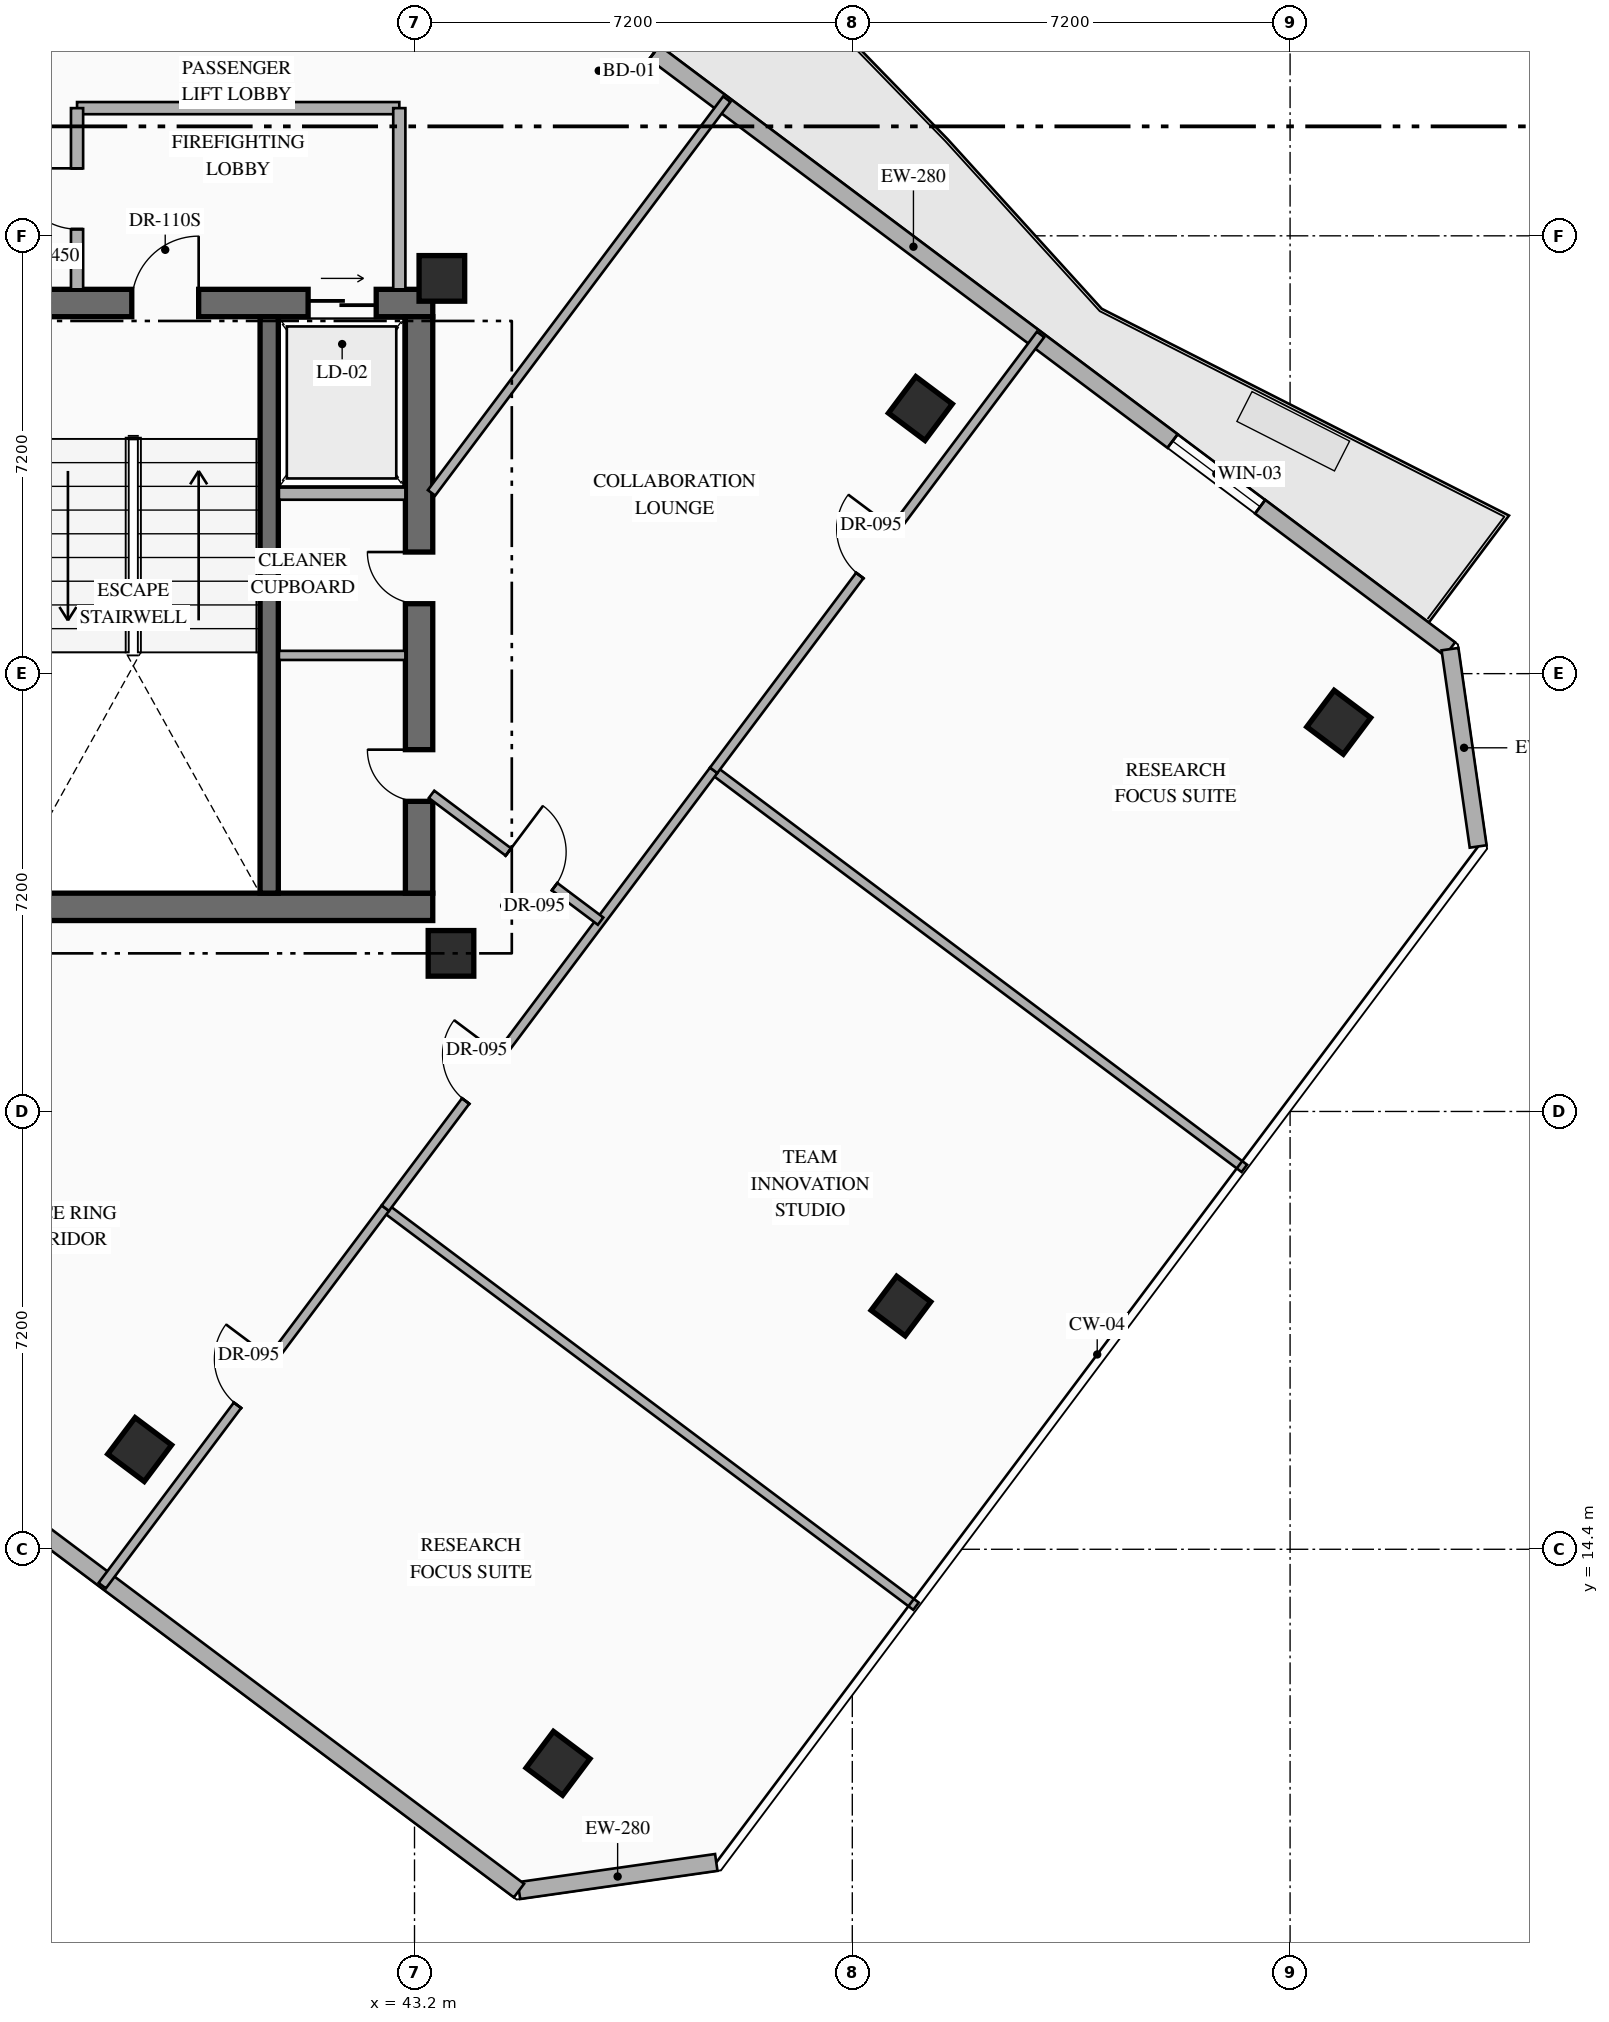
"""IFC4 building model, lengths in metres.
Left out: names, types, materials, properties, quantities, classifications, styles, units other than length and angle.
Written with IfcOpenShell. Run it as: python <this file> out.ifc"""

import sys

from ifc_helpers import new_model, si_unit, direction, frame, frame_2d, origin, origin_2d, place, context, subcontext, project, spatial, rectangle, hollow_rectangle, extrude, element, fill, save


model = new_model("IFC4")
c1 = context("Model", 3, precision=1e-05, world=origin(), true_north=direction((0.0, 1.0)))
c2 = subcontext(c1, "Body", "Model", "MODEL_VIEW")
j1 = project(units=[si_unit("LENGTHUNIT", "METRE"), si_unit("PLANEANGLEUNIT", "RADIAN")], contexts=[c1])
p1 = place(None, origin())
s1 = spatial("IfcSite", under=j1, at=p1, CompositionType="ELEMENT")
p2 = place(p1, origin())
s2 = spatial("IfcBuilding", under=s1, at=p2, CompositionType="ELEMENT")
p3 = place(p2, frame((0.0, 0.0, 198.75)))
s3 = spatial("IfcBuildingStorey", under=s2, at=p3, CompositionType="ELEMENT", Elevation=198.75)
p4 = place(p3, frame((36.04, 24.965, 0.0), z_axis=(0.0, 0.0, 1.0), x_axis=(1.0, 0.0, 0.0)))
e1 = element("IfcWall", 1, at=p4, inside=s3, PredefinedType="SHEAR", context=c2, shape_type="SweptSolid", body=[
    extrude(rectangle(XDim=7.46, YDim=0.45, at=frame_2d((3.73, 0.0))), origin(), (0.0, 0.0, 1.0), 3.6),
])
p5 = place(p3, frame((36.04, 34.895, 0.0), z_axis=(0.0, 0.0, 1.0), x_axis=(1.0, 0.0, 0.0)))
e2 = element("IfcWall", 2, at=p5, inside=s3, PredefinedType="SHEAR", context=c2, shape_type="SweptSolid", body=[
    extrude(rectangle(XDim=7.46, YDim=0.45, at=frame_2d((3.73, 0.0))), origin(), (0.0, 0.0, 1.0), 3.6),
])
p6 = place(p5, frame((2.51, 0.0, 0.0)))
e3 = element("IfcOpeningElement", 3, at=p6, cuts=e2, PredefinedType="OPENING", context=c2, shape_type="SweptSolid", body=[
    extrude(rectangle(XDim=1.1, YDim=2.2, at=frame_2d((0.55, 1.1))), frame((0.0, 0.235, 0.0), z_axis=(0.0, -1.0, 0.0), x_axis=(1.0, 0.0, 0.0)), (0.0, 0.0, 1.0), 0.47),
])
p7 = place(p5, frame((5.41, 0.0, 0.0)))
e4 = element("IfcOpeningElement", 4, at=p7, cuts=e2, PredefinedType="OPENING", context=c2, shape_type="SweptSolid", body=[
    extrude(rectangle(XDim=1.12, YDim=2.15, at=frame_2d((0.56, 1.075))), frame((0.0, 0.235, 0.0), z_axis=(0.0, -1.0, 0.0), x_axis=(1.0, 0.0, 0.0)), (0.0, 0.0, 1.0), 0.47),
])
p8 = place(p3, frame((43.275, 25.19, 0.0), z_axis=(0.0, 0.0, 1.0), x_axis=(0.0, 1.0, 0.0)))
e5 = element("IfcWall", 5, at=p8, inside=s3, PredefinedType="SHEAR", context=c2, shape_type="SweptSolid", body=[
    extrude(rectangle(XDim=9.48, YDim=0.45, at=frame_2d((4.74, 0.0))), origin(), (0.0, 0.0, 1.0), 3.6),
])
p9 = place(p8, frame((1.51, 0.0, 0.0)))
e6 = element("IfcOpeningElement", 6, at=p9, cuts=e5, PredefinedType="OPENING", context=c2, shape_type="SweptSolid", body=[
    extrude(rectangle(XDim=0.85, YDim=2.08, at=frame_2d((0.425, 1.04))), frame((0.0, 0.235, 0.0), z_axis=(0.0, -1.0, 0.0), x_axis=(1.0, 0.0, 0.0)), (0.0, 0.0, 1.0), 0.47),
])
p10 = place(p8, frame((4.76, 0.0, 0.0)))
e7 = element("IfcOpeningElement", 7, at=p10, cuts=e5, PredefinedType="OPENING", context=c2, shape_type="SweptSolid", body=[
    extrude(rectangle(XDim=0.85, YDim=2.08, at=frame_2d((0.425, 1.04))), frame((0.0, 0.235, 0.0), z_axis=(0.0, -1.0, 0.0), x_axis=(1.0, 0.0, 0.0)), (0.0, 0.0, 1.0), 0.47),
])
p11 = place(p3, frame((40.81, 25.19, 0.0), z_axis=(0.0, 0.0, 1.0), x_axis=(0.0, 1.0, 0.0)))
e8 = element("IfcWall", 8, at=p11, inside=s3, PredefinedType="SHEAR", context=c2, shape_type="SweptSolid", body=[
    extrude(rectangle(XDim=9.48, YDim=0.3, at=frame_2d((4.74, 0.0))), origin(), (0.0, 0.0, 1.0), 3.6),
])
for number, where, z_axis, x_axis in (
    (9, (43.8, 24.2, 0.0), (0.0, 0.0, 1.0), (1.0, 0.0, 0.0)),
    (10, (43.65, 35.3, 0.0), (0.0, 0.0, 1.0), (1.0, 0.0, 0.0)),
    (11, (38.68, 16.04, 0.0), (0.0, 0.0, 1.0), (0.8, -0.6, 0.0)),
    (12, (51.52, 33.16, 0.0), (0.0, 0.0, 1.0), (0.8, -0.6, 0.0)),
    (13, (45.56, 10.88, 0.0), (0.0, 0.0, 1.0), (0.8, -0.6, 0.0)),
    (14, (58.4, 28.0, 0.0), (0.0, 0.0, 1.0), (0.8, -0.6, 0.0)),
):
    element("IfcColumn", number, at=place(p3, frame(where, z_axis=z_axis, x_axis=x_axis)), inside=s3, PredefinedType="COLUMN", context=c2, shape_type="SweptSolid", body=[
        extrude(hollow_rectangle(XDim=0.75, YDim=0.75, WallThickness=0.028, at=origin_2d()), origin(), (0.0, 0.0, 1.0), 3.6),
    ])
p12 = place(p3, frame((51.2, 18.4, 0.0), z_axis=(0.0, 0.0, 1.0), x_axis=(0.799999996291, -0.600000004945, 0.0)))
e15 = element("IfcColumn", 15, at=p12, inside=s3, PredefinedType="COLUMN", context=c2, shape_type="SweptSolid", body=[
    extrude(hollow_rectangle(XDim=0.7, YDim=0.7, WallThickness=0.028, at=origin_2d()), origin(), (0.0, 0.0, 1.0), 3.6),
])
p13 = place(p3, frame((44.86, 40.73, 0.0), z_axis=(0.0, 0.0, 1.0), x_axis=(0.800007624502, -0.599989833863, 0.0)))
e16 = element("IfcWall", 16, at=p13, inside=s3, PredefinedType="STANDARD", context=c2, shape_type="SweptSolid", body=[
    extrude(rectangle(XDim=19.212, YDim=0.28, at=frame_2d((9.606, 0.0))), origin(), (0.0, 0.0, 1.0), 3.35),
])
p14 = place(p13, frame((1.755, 0.0, 0.0)))
e17 = element("IfcOpeningElement", 17, at=p14, cuts=e16, PredefinedType="OPENING", context=c2, shape_type="SweptSolid", body=[
    extrude(rectangle(XDim=1.1, YDim=2.2, at=frame_2d((0.55, 1.1))), frame((0.0, 0.15, 0.0), z_axis=(0.0, -1.0, 0.0), x_axis=(1.0, 0.0, 0.0)), (0.0, 0.0, 1.0), 0.3),
])
p15 = place(p13, frame((13.509, 0.0, 0.85)))
e18 = element("IfcOpeningElement", 18, at=p15, cuts=e16, PredefinedType="OPENING", context=c2, shape_type="SweptSolid", body=[
    extrude(rectangle(XDim=1.8, YDim=2.1, at=frame_2d((0.9, 1.05))), frame((0.0, 0.15, 0.0), z_axis=(0.0, -1.0, 0.0), x_axis=(1.0, 0.0, 0.0)), (0.0, 0.0, 1.0), 0.3),
])
p16 = place(p3, frame((60.23, 29.203, 0.0), z_axis=(0.0, 0.0, 1.0), x_axis=(0.141296221922, -0.989967361922, 0.0)))
e19 = element("IfcWall", 19, at=p16, inside=s3, PredefinedType="STANDARD", context=c2, shape_type="SweptSolid", body=[
    extrude(rectangle(XDim=3.278, YDim=0.28, at=frame_2d((1.639, 0.0))), origin(), (0.0, 0.0, 1.0), 3.35),
])
p17 = place(p3, frame((48.163, 9.25, 0.0), z_axis=(0.0, 0.0, 1.0), x_axis=(-0.989979263428, -0.141212810973, 0.0)))
e20 = element("IfcWall", 20, at=p17, inside=s3, PredefinedType="STANDARD", context=c2, shape_type="SweptSolid", body=[
    extrude(rectangle(XDim=3.278, YDim=0.28, at=frame_2d((1.639, 0.0))), origin(), (0.0, 0.0, 1.0), 3.35),
])
p18 = place(p3, frame((44.918, 8.787, 0.0), z_axis=(0.0, 0.0, 1.0), x_axis=(-0.800004765927, 0.599993645378, 0.0)))
e21 = element("IfcWall", 21, at=p18, inside=s3, PredefinedType="STANDARD", context=c2, shape_type="SweptSolid", body=[
    extrude(rectangle(XDim=24.588, YDim=0.28, at=frame_2d((12.294, 0.0))), origin(), (0.0, 0.0, 1.0), 3.35),
])
p19 = place(p3, frame((40.97, 31.76, 0.0), z_axis=(0.0, 0.0, 1.0), x_axis=(1.0, 0.0, 0.0)))
e22 = element("IfcWall", 22, at=p19, inside=s3, PredefinedType="STANDARD", context=c2, shape_type="SweptSolid", body=[
    extrude(rectangle(XDim=2.08, YDim=0.2, at=frame_2d((1.04, 0.0))), origin(), (0.0, 0.0, 1.0), 3.35),
])
p20 = place(p3, frame((40.97, 29.1, 0.0), z_axis=(0.0, 0.0, 1.0), x_axis=(1.0, 0.0, 0.0)))
e23 = element("IfcWall", 23, at=p20, inside=s3, PredefinedType="PARTITIONING", context=c2, shape_type="SweptSolid", body=[
    extrude(rectangle(XDim=2.08, YDim=0.15, at=frame_2d((1.04, 0.0))), origin(), (0.0, 0.0, 1.0), 3.35),
])
p21 = place(p3, frame((37.65, 38.1, 0.0), z_axis=(0.0, 0.0, 1.0), x_axis=(1.0, 0.0, 0.0)))
e24 = element("IfcWall", 24, at=p21, inside=s3, PredefinedType="STANDARD", context=c2, shape_type="SweptSolid", body=[
    extrude(rectangle(XDim=5.3, YDim=0.2, at=frame_2d((2.65, 0.0))), origin(), (0.0, 0.0, 1.0), 3.35),
])
p22 = place(p3, frame((42.95, 35.12, 0.0), z_axis=(0.0, 0.0, 1.0), x_axis=(0.0, 1.0, 0.0)))
e25 = element("IfcWall", 25, at=p22, inside=s3, PredefinedType="STANDARD", context=c2, shape_type="SweptSolid", body=[
    extrude(rectangle(XDim=2.98, YDim=0.2, at=frame_2d((1.49, 0.0))), origin(), (0.0, 0.0, 1.0), 3.35),
])
p23 = place(p3, frame((37.65, 35.12, 0.0), z_axis=(0.0, 0.0, 1.0), x_axis=(0.0, 1.0, 0.0)))
e26 = element("IfcWall", 26, at=p23, inside=s3, PredefinedType="STANDARD", context=c2, shape_type="SweptSolid", body=[
    extrude(rectangle(XDim=2.98, YDim=0.2, at=frame_2d((1.49, 0.0))), origin(), (0.0, 0.0, 1.0), 3.35),
])
p24 = place(p23, frame((0.99, 0.0, 0.0)))
e27 = element("IfcOpeningElement", 27, at=p24, cuts=e26, PredefinedType="OPENING", context=c2, shape_type="SweptSolid", body=[
    extrude(rectangle(XDim=1.0, YDim=2.2, at=frame_2d((0.5, 1.1))), frame((0.0, 0.11, 0.0), z_axis=(0.0, -1.0, 0.0), x_axis=(1.0, 0.0, 0.0)), (0.0, 0.0, 1.0), 0.22),
])
p25 = place(p3, frame((42.72, 20.01, 0.0), z_axis=(0.0, 0.0, 1.0), x_axis=(0.800005370633, -0.599992839089, 0.0)))
e28 = element("IfcWall", 28, at=p25, inside=s3, PredefinedType="PARTITIONING", context=c2, shape_type="SweptSolid", body=[
    extrude(rectangle(XDim=10.91, YDim=0.15, at=frame_2d((5.455, 0.0))), origin(), (0.0, 0.0, 1.0), 3.35),
])
p26 = place(p3, frame((38.064, 13.802, 0.0), z_axis=(0.0, 0.0, 1.0), x_axis=(0.6, 0.8, 0.0)))
e29 = element("IfcWall", 29, at=p26, inside=s3, PredefinedType="PARTITIONING", context=c2, shape_type="SweptSolid", body=[
    extrude(rectangle(XDim=7.76, YDim=0.15, at=frame_2d((3.88, 0.0))), origin(), (0.0, 0.0, 1.0), 3.35),
])
p27 = place(p26, frame((3.708, 0.0, 0.0)))
e30 = element("IfcOpeningElement", 30, at=p27, cuts=e29, PredefinedType="OPENING", context=c2, shape_type="SweptSolid", body=[
    extrude(rectangle(XDim=0.95, YDim=2.15, at=frame_2d((0.475, 1.075))), frame((0.0, 0.085, 0.0), z_axis=(0.0, -1.0, 0.0), x_axis=(1.0, 0.0, 0.0)), (0.0, 0.0, 1.0), 0.17),
])
p28 = place(p3, frame((48.12, 27.21, 0.0), z_axis=(0.0, 0.0, 1.0), x_axis=(0.799997314611, -0.600003580502, 0.0)))
e31 = element("IfcWall", 31, at=p28, inside=s3, PredefinedType="PARTITIONING", context=c2, shape_type="SweptSolid", body=[
    extrude(rectangle(XDim=10.91, YDim=0.15, at=frame_2d((5.455, 0.0))), origin(), (0.0, 0.0, 1.0), 3.045),
])
p29 = place(p3, frame((42.72, 20.01, 0.0), z_axis=(0.0, 0.0, 1.0), x_axis=(0.600013020683, 0.799990234322, 0.0)))
e32 = element("IfcWall", 32, at=p29, inside=s3, PredefinedType="PARTITIONING", context=c2, shape_type="SweptSolid", body=[
    extrude(rectangle(XDim=9.0, YDim=0.15, at=frame_2d((4.5, 0.0))), origin(), (0.0, 0.0, 1.0), 3.35),
])
p30 = place(p29, frame((2.202, 0.0, 0.0)))
e33 = element("IfcOpeningElement", 33, at=p30, cuts=e32, PredefinedType="OPENING", context=c2, shape_type="SweptSolid", body=[
    extrude(rectangle(XDim=0.95, YDim=2.15, at=frame_2d((0.475, 1.075))), frame((0.0, 0.085, 0.0), z_axis=(0.0, -1.0, 0.0), x_axis=(1.0, 0.0, 0.0)), (0.0, 0.0, 1.0), 0.17),
])
p31 = place(p3, frame((48.12, 27.21, 0.0), z_axis=(0.0, 0.0, 1.0), x_axis=(0.6, 0.8, 0.0)))
e34 = element("IfcWall", 34, at=p31, inside=s3, PredefinedType="PARTITIONING", context=c2, shape_type="SweptSolid", body=[
    extrude(rectangle(XDim=8.96, YDim=0.15, at=frame_2d((4.48, 0.0))), origin(), (0.0, 0.0, 1.0), 3.35),
])
p32 = place(p31, frame((4.005, 0.0, 0.0)))
e35 = element("IfcOpeningElement", 35, at=p32, cuts=e34, PredefinedType="OPENING", context=c2, shape_type="SweptSolid", body=[
    extrude(rectangle(XDim=0.95, YDim=2.15, at=frame_2d((0.475, 1.075))), frame((0.0, 0.085, 0.0), z_axis=(0.0, -1.0, 0.0), x_axis=(1.0, 0.0, 0.0)), (0.0, 0.0, 1.0), 0.17),
])
p33 = place(p3, frame((43.48, 26.815, 0.0), z_axis=(0.0, 0.0, 1.0), x_axis=(0.800008430676, -0.599988758934, 0.0)))
e36 = element("IfcWall", 36, at=p33, inside=s3, PredefinedType="PARTITIONING", context=c2, shape_type="SweptSolid", body=[
    extrude(rectangle(XDim=3.475, YDim=0.15, at=frame_2d((1.738, 0.0))), origin(), (0.0, 0.0, 1.0), 3.35),
])
p34 = place(p33, frame((1.58, 0.0, 0.0)))
e37 = element("IfcOpeningElement", 37, at=p34, cuts=e36, PredefinedType="OPENING", context=c2, shape_type="SweptSolid", body=[
    extrude(rectangle(XDim=0.95, YDim=2.15, at=frame_2d((0.475, 1.075))), frame((0.0, 0.085, 0.0), z_axis=(0.0, -1.0, 0.0), x_axis=(1.0, 0.0, 0.0)), (0.0, 0.0, 1.0), 0.17),
])
p35 = place(p3, frame((43.48, 31.773, 0.0), z_axis=(0.0, 0.0, 1.0), x_axis=(0.599971041729, 0.800021717885, 0.0)))
e38 = element("IfcWall", 38, at=p35, inside=s3, PredefinedType="PARTITIONING", context=c2, shape_type="SweptSolid", body=[
    extrude(rectangle(XDim=8.094, YDim=0.15, at=frame_2d((4.047, 0.0))), origin(), (0.0, 0.0, 1.0), 3.35),
])
p36 = place(p14, origin())
e39 = element("IfcDoor", 39, at=p36, inside=s3, OperationType="SINGLE_SWING_LEFT", PredefinedType="DOOR", context=c2, shape_type="SweptSolid", body=[
    extrude(rectangle(XDim=1.1, YDim=2.2, at=frame_2d((0.55, 1.1))), frame((0.0, 0.025, 0.0), z_axis=(0.0, -1.0, 0.0), x_axis=(1.0, 0.0, 0.0)), (0.0, 0.0, 1.0), 0.05),
])
fill(e17, e39)
p37 = place(p15, origin())
e40 = element("IfcWindow", 40, at=p37, inside=s3, PartitioningType="SINGLE_PANEL", PredefinedType="WINDOW", context=c2, shape_type="SweptSolid", body=[
    extrude(rectangle(XDim=1.8, YDim=2.1, at=frame_2d((0.9, 1.05))), frame((0.0, 0.03, 0.0), z_axis=(0.0, -1.0, 0.0), x_axis=(1.0, 0.0, 0.0)), (0.0, 0.0, 1.0), 0.06),
])
fill(e18, e40)
p38 = place(p6, origin())
e41 = element("IfcDoor", 41, at=p38, inside=s3, OperationType="SINGLE_SWING_RIGHT", PredefinedType="DOOR", context=c2, shape_type="SweptSolid", body=[
    extrude(rectangle(XDim=1.1, YDim=2.2, at=frame_2d((0.55, 1.1))), frame((0.0, 0.025, 0.0), z_axis=(0.0, -1.0, 0.0), x_axis=(1.0, 0.0, 0.0)), (0.0, 0.0, 1.0), 0.05),
])
fill(e3, e41)
p39 = place(p7, origin())
e42 = element("IfcDoor", 42, at=p39, inside=s3, OperationType="SLIDING_TO_RIGHT", PredefinedType="USERDEFINED", context=c2, shape_type="SweptSolid", body=[
    extrude(rectangle(XDim=1.12, YDim=2.15, at=frame_2d((0.56, 1.075))), frame((0.0, 0.025, 0.0), z_axis=(0.0, -1.0, 0.0), x_axis=(1.0, 0.0, 0.0)), (0.0, 0.0, 1.0), 0.05),
])
fill(e4, e42)
p40 = place(p9, origin())
e43 = element("IfcDoor", 43, at=p40, inside=s3, OperationType="SINGLE_SWING_RIGHT", PredefinedType="DOOR", context=c2, shape_type="SweptSolid", body=[
    extrude(rectangle(XDim=0.85, YDim=2.08, at=frame_2d((0.425, 1.04))), frame((0.0, 0.025, 0.0), z_axis=(0.0, -1.0, 0.0), x_axis=(1.0, 0.0, 0.0)), (0.0, 0.0, 1.0), 0.05),
])
fill(e6, e43)
p41 = place(p10, origin())
e44 = element("IfcDoor", 44, at=p41, inside=s3, OperationType="SINGLE_SWING_RIGHT", PredefinedType="DOOR", context=c2, shape_type="SweptSolid", body=[
    extrude(rectangle(XDim=0.85, YDim=2.08, at=frame_2d((0.425, 1.04))), frame((0.0, 0.025, 0.0), z_axis=(0.0, -1.0, 0.0), x_axis=(1.0, 0.0, 0.0)), (0.0, 0.0, 1.0), 0.05),
])
fill(e7, e44)
p42 = place(p24, origin())
e45 = element("IfcDoor", 45, at=p42, inside=s3, OperationType="SINGLE_SWING_RIGHT", PredefinedType="DOOR", context=c2, shape_type="SweptSolid", body=[
    extrude(rectangle(XDim=1.0, YDim=2.2, at=frame_2d((0.5, 1.1))), frame((0.0, 0.025, 0.0), z_axis=(0.0, -1.0, 0.0), x_axis=(1.0, 0.0, 0.0)), (0.0, 0.0, 1.0), 0.05),
])
fill(e27, e45)
p43 = place(p27, origin())
e46 = element("IfcDoor", 46, at=p43, inside=s3, OperationType="SINGLE_SWING_RIGHT", PredefinedType="DOOR", context=c2, shape_type="SweptSolid", body=[
    extrude(rectangle(XDim=0.95, YDim=2.15, at=frame_2d((0.475, 1.075))), frame((0.0, 0.025, 0.0), z_axis=(0.0, -1.0, 0.0), x_axis=(1.0, 0.0, 0.0)), (0.0, 0.0, 1.0), 0.05),
])
fill(e30, e46)
p44 = place(p30, origin())
e47 = element("IfcDoor", 47, at=p44, inside=s3, OperationType="SINGLE_SWING_RIGHT", PredefinedType="DOOR", context=c2, shape_type="SweptSolid", body=[
    extrude(rectangle(XDim=0.95, YDim=2.15, at=frame_2d((0.475, 1.075))), frame((0.0, 0.025, 0.0), z_axis=(0.0, -1.0, 0.0), x_axis=(1.0, 0.0, 0.0)), (0.0, 0.0, 1.0), 0.05),
])
fill(e33, e47)
p45 = place(p32, origin())
e48 = element("IfcDoor", 48, at=p45, inside=s3, OperationType="SINGLE_SWING_RIGHT", PredefinedType="DOOR", context=c2, shape_type="SweptSolid", body=[
    extrude(rectangle(XDim=0.95, YDim=2.15, at=frame_2d((0.475, 1.075))), frame((0.0, 0.025, 0.0), z_axis=(0.0, -1.0, 0.0), x_axis=(1.0, 0.0, 0.0)), (0.0, 0.0, 1.0), 0.05),
])
fill(e35, e48)
p46 = place(p34, origin())
e49 = element("IfcDoor", 49, at=p46, inside=s3, OperationType="SINGLE_SWING_LEFT", PredefinedType="DOOR", context=c2, shape_type="SweptSolid", body=[
    extrude(rectangle(XDim=0.95, YDim=2.15, at=frame_2d((0.475, 1.075))), frame((0.0, 0.025, 0.0), z_axis=(0.0, -1.0, 0.0), x_axis=(1.0, 0.0, 0.0)), (0.0, 0.0, 1.0), 0.05),
])
fill(e37, e49)
save(model, sys.argv[1])
